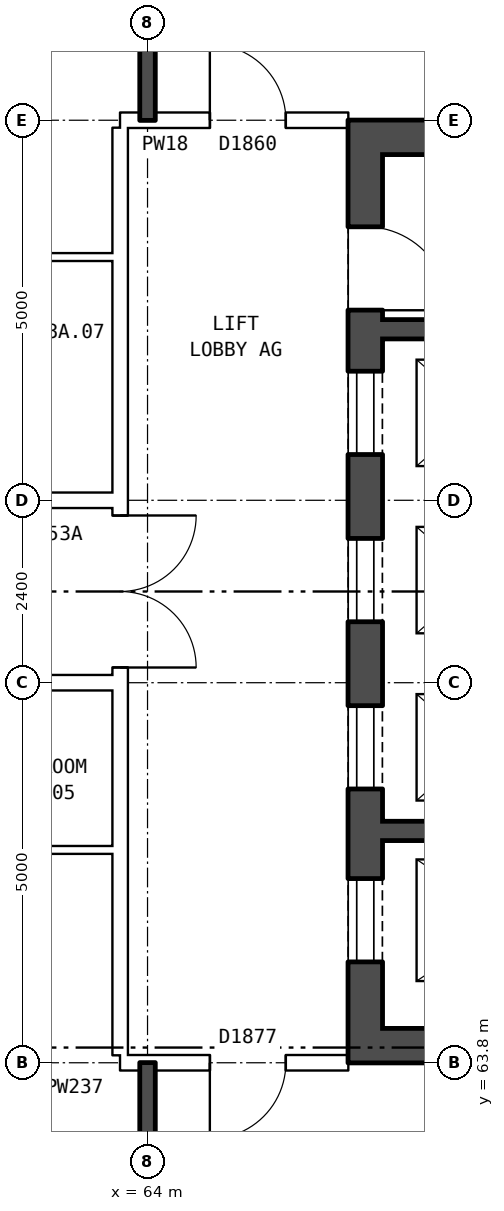
"""IFC4 building model, lengths in metres.
Left out: names, types, materials, properties, quantities, classifications, styles, units other than length and angle.
Written with IfcOpenShell. Run it as: python <this file> out.ifc"""

import sys

from ifc_helpers import new_model, si_unit, direction, frame, frame_2d, origin, place, context, subcontext, project, spatial, rectangle, extrude, element, fill, save


model = new_model("IFC4")
c1 = context("Model", 3, precision=1e-05, world=origin(), true_north=direction((0.0, 1.0)))
c2 = subcontext(c1, "Body", "Model", "MODEL_VIEW")
j1 = project(units=[si_unit("LENGTHUNIT", "METRE"), si_unit("PLANEANGLEUNIT", "RADIAN")], contexts=[c1])
p1 = place(None, origin())
s1 = spatial("IfcSite", under=j1, at=p1, CompositionType="ELEMENT")
p2 = place(p1, origin())
s2 = spatial("IfcBuilding", under=s1, at=p2, CompositionType="ELEMENT")
p3 = place(p2, frame((0.0, 0.0, 188.2)))
s3 = spatial("IfcBuildingStorey", under=s2, at=p3, CompositionType="ELEMENT", Elevation=188.2)
p4 = place(p3, frame((66.865, 63.8, 0.0), z_axis=(0.0, 0.0, 1.0), x_axis=(0.0, 1.0, 0.0)))
e1 = element("IfcWall", 1, at=p4, inside=s3, PredefinedType="SHEAR", context=c2, shape_type="SweptSolid", body=[
    extrude(rectangle(XDim=12.4, YDim=0.45, at=frame_2d((6.2, 0.0))), origin(), (0.0, 0.0, 1.0), 2.85),
])
p5 = place(p4, frame((1.325, 0.0, 0.0)))
e2 = element("IfcOpeningElement", 2, at=p5, cuts=e1, PredefinedType="OPENING", context=c2, shape_type="SweptSolid", body=[
    extrude(rectangle(XDim=1.1, YDim=2.1, at=frame_2d((0.55, 1.05))), frame((0.0, 0.235, 0.0), z_axis=(0.0, -1.0, 0.0), x_axis=(1.0, 0.0, 0.0)), (0.0, 0.0, 1.0), 0.47),
])
p6 = place(p4, frame((3.6, 0.0, 0.0)))
e3 = element("IfcOpeningElement", 3, at=p6, cuts=e1, PredefinedType="OPENING", context=c2, shape_type="SweptSolid", body=[
    extrude(rectangle(XDim=1.1, YDim=2.1, at=frame_2d((0.55, 1.05))), frame((0.0, 0.235, 0.0), z_axis=(0.0, -1.0, 0.0), x_axis=(1.0, 0.0, 0.0)), (0.0, 0.0, 1.0), 0.47),
])
p7 = place(p4, frame((5.8, 0.0, 0.0)))
e4 = element("IfcOpeningElement", 4, at=p7, cuts=e1, PredefinedType="OPENING", context=c2, shape_type="SweptSolid", body=[
    extrude(rectangle(XDim=1.1, YDim=2.1, at=frame_2d((0.55, 1.05))), frame((0.0, 0.235, 0.0), z_axis=(0.0, -1.0, 0.0), x_axis=(1.0, 0.0, 0.0)), (0.0, 0.0, 1.0), 0.47),
])
p8 = place(p4, frame((8.0, 0.0, 0.0)))
e5 = element("IfcOpeningElement", 5, at=p8, cuts=e1, PredefinedType="OPENING", context=c2, shape_type="SweptSolid", body=[
    extrude(rectangle(XDim=1.1, YDim=2.1, at=frame_2d((0.55, 1.05))), frame((0.0, 0.235, 0.0), z_axis=(0.0, -1.0, 0.0), x_axis=(1.0, 0.0, 0.0)), (0.0, 0.0, 1.0), 0.47),
])
p9 = place(p4, frame((9.9, 0.0, 0.0)))
e6 = element("IfcOpeningElement", 6, at=p9, cuts=e1, PredefinedType="OPENING", context=c2, shape_type="SweptSolid", body=[
    extrude(rectangle(XDim=1.1, YDim=2.1, at=frame_2d((0.55, 1.05))), frame((0.0, 0.235, 0.0), z_axis=(0.0, -1.0, 0.0), x_axis=(1.0, 0.0, 0.0)), (0.0, 0.0, 1.0), 0.47),
])
for number, where, z_axis, x_axis in (
    (7, (67.09, 64.025, 0.0), (0.0, 0.0, 1.0), (1.0, 0.0, 0.0)),
    (8, (67.09, 75.975, 0.0), (0.0, 0.0, 1.0), (1.0, 0.0, 0.0)),
):
    element("IfcWall", number, at=place(p3, frame(where, z_axis=z_axis, x_axis=x_axis)), inside=s3, PredefinedType="SHEAR", context=c2, shape_type="SweptSolid", body=[
        extrude(rectangle(XDim=8.1, YDim=0.45, at=frame_2d((4.05, 0.0))), origin(), (0.0, 0.0, 1.0), 2.85),
    ])
p10 = place(p3, frame((67.09, 66.85, 0.0), z_axis=(0.0, 0.0, 1.0), x_axis=(1.0, 0.0, 0.0)))
e9 = element("IfcWall", 9, at=p10, inside=s3, PredefinedType="SHEAR", context=c2, shape_type="SweptSolid", body=[
    extrude(rectangle(XDim=3.545, YDim=0.25, at=frame_2d((1.772, 0.0))), origin(), (0.0, 0.0, 1.0), 2.85),
])
p11 = place(p3, frame((67.09, 73.45, 0.0), z_axis=(0.0, 0.0, 1.0), x_axis=(1.0, 0.0, 0.0)))
e10 = element("IfcWall", 10, at=p11, inside=s3, PredefinedType="SHEAR", context=c2, shape_type="SweptSolid", body=[
    extrude(rectangle(XDim=2.475, YDim=0.25, at=frame_2d((1.237, 0.0))), origin(), (0.0, 0.0, 1.0), 2.85),
])
p12 = place(p3, frame((63.64, 63.9, 0.0), z_axis=(0.0, 0.0, 1.0), x_axis=(0.0, 1.0, 0.0)))
e11 = element("IfcWall", 11, at=p12, inside=s3, PredefinedType="PARTITIONING", context=c2, shape_type="SweptSolid", body=[
    extrude(rectangle(XDim=12.2, YDim=0.2, at=frame_2d((6.1, 0.0))), origin(), (0.0, 0.0, 1.0), 2.85),
])
p13 = place(p12, frame((5.1, 0.0, 0.0)))
e12 = element("IfcOpeningElement", 12, at=p13, cuts=e11, PredefinedType="OPENING", context=c2, shape_type="SweptSolid", body=[
    extrude(rectangle(XDim=2.0, YDim=2.1, at=frame_2d((1.0, 1.05))), frame((0.0, 0.11, 0.0), z_axis=(0.0, -1.0, 0.0), x_axis=(1.0, 0.0, 0.0)), (0.0, 0.0, 1.0), 0.22),
])
p14 = place(p3, frame((63.64, 63.8, 0.0), z_axis=(0.0, 0.0, 1.0), x_axis=(1.0, 0.0, 0.0)))
e13 = element("IfcWall", 13, at=p14, inside=s3, PredefinedType="PARTITIONING", context=c2, shape_type="SweptSolid", body=[
    extrude(rectangle(XDim=3.0, YDim=0.2, at=frame_2d((1.5, 0.0))), origin(), (0.0, 0.0, 1.0), 2.85),
])
p15 = place(p14, frame((1.18, 0.0, 0.0)))
e14 = element("IfcOpeningElement", 14, at=p15, cuts=e13, PredefinedType="OPENING", context=c2, shape_type="SweptSolid", body=[
    extrude(rectangle(XDim=1.0, YDim=2.1, at=frame_2d((0.5, 1.05))), frame((0.0, 0.11, 0.0), z_axis=(0.0, -1.0, 0.0), x_axis=(1.0, 0.0, 0.0)), (0.0, 0.0, 1.0), 0.22),
])
p16 = place(p3, frame((61.0, 66.6, 0.0), z_axis=(0.0, 0.0, 1.0), x_axis=(1.0, 0.0, 0.0)))
e15 = element("IfcWall", 15, at=p16, inside=s3, PredefinedType="PARTITIONING", context=c2, shape_type="SweptSolid", body=[
    extrude(rectangle(XDim=2.64, YDim=0.1, at=frame_2d((1.32, 0.0))), origin(), (0.0, 0.0, 1.0), 2.85),
])
p17 = place(p3, frame((44.36, 68.8, 0.0), z_axis=(0.0, 0.0, 1.0), x_axis=(1.0, 0.0, 0.0)))
e16 = element("IfcWall", 16, at=p17, inside=s3, PredefinedType="PARTITIONING", context=c2, shape_type="SweptSolid", body=[
    extrude(rectangle(XDim=19.28, YDim=0.2, at=frame_2d((9.64, 0.0))), origin(), (0.0, 0.0, 1.0), 2.85),
])
p18 = place(p17, frame((14.64, 0.0, 0.0)))
e17 = element("IfcOpeningElement", 17, at=p18, cuts=e16, PredefinedType="OPENING", context=c2, shape_type="SweptSolid", body=[
    extrude(rectangle(XDim=1.0, YDim=2.1, at=frame_2d((0.5, 1.05))), frame((0.0, 0.11, 0.0), z_axis=(0.0, -1.0, 0.0), x_axis=(1.0, 0.0, 0.0)), (0.0, 0.0, 1.0), 0.22),
])
p19 = place(p17, frame((5.64, 0.0, 0.0)))
e18 = element("IfcOpeningElement", 18, at=p19, cuts=e16, PredefinedType="OPENING", context=c2, shape_type="SweptSolid", body=[
    extrude(rectangle(XDim=1.0, YDim=2.1, at=frame_2d((0.5, 1.05))), frame((0.0, 0.11, 0.0), z_axis=(0.0, -1.0, 0.0), x_axis=(1.0, 0.0, 0.0)), (0.0, 0.0, 1.0), 0.22),
])
p20 = place(p3, frame((44.36, 71.2, 0.0), z_axis=(0.0, 0.0, 1.0), x_axis=(1.0, 0.0, 0.0)))
e19 = element("IfcWall", 19, at=p20, inside=s3, PredefinedType="PARTITIONING", context=c2, shape_type="SweptSolid", body=[
    extrude(rectangle(XDim=19.28, YDim=0.2, at=frame_2d((9.64, 0.0))), origin(), (0.0, 0.0, 1.0), 2.85),
])
p21 = place(p20, frame((14.64, 0.0, 0.0)))
e20 = element("IfcOpeningElement", 20, at=p21, cuts=e19, PredefinedType="OPENING", context=c2, shape_type="SweptSolid", body=[
    extrude(rectangle(XDim=1.0, YDim=2.1, at=frame_2d((0.5, 1.05))), frame((0.0, 0.11, 0.0), z_axis=(0.0, -1.0, 0.0), x_axis=(1.0, 0.0, 0.0)), (0.0, 0.0, 1.0), 0.22),
])
p22 = place(p20, frame((5.64, 0.0, 0.0)))
e21 = element("IfcOpeningElement", 21, at=p22, cuts=e19, PredefinedType="OPENING", context=c2, shape_type="SweptSolid", body=[
    extrude(rectangle(XDim=1.0, YDim=2.1, at=frame_2d((0.5, 1.05))), frame((0.0, 0.11, 0.0), z_axis=(0.0, -1.0, 0.0), x_axis=(1.0, 0.0, 0.0)), (0.0, 0.0, 1.0), 0.22),
])
p23 = place(p3, frame((61.0, 74.4, 0.0), z_axis=(0.0, 0.0, 1.0), x_axis=(1.0, 0.0, 0.0)))
e22 = element("IfcWall", 22, at=p23, inside=s3, PredefinedType="PARTITIONING", context=c2, shape_type="SweptSolid", body=[
    extrude(rectangle(XDim=2.64, YDim=0.1, at=frame_2d((1.32, 0.0))), origin(), (0.0, 0.0, 1.0), 2.85),
])
p24 = place(p3, frame((63.64, 76.2, 0.0), z_axis=(0.0, 0.0, 1.0), x_axis=(1.0, 0.0, 0.0)))
e23 = element("IfcWall", 23, at=p24, inside=s3, PredefinedType="PARTITIONING", context=c2, shape_type="SweptSolid", body=[
    extrude(rectangle(XDim=3.0, YDim=0.2, at=frame_2d((1.5, 0.0))), origin(), (0.0, 0.0, 1.0), 2.85),
])
p25 = place(p24, frame((1.18, 0.0, 0.0)))
e24 = element("IfcOpeningElement", 24, at=p25, cuts=e23, PredefinedType="OPENING", context=c2, shape_type="SweptSolid", body=[
    extrude(rectangle(XDim=1.0, YDim=2.1, at=frame_2d((0.5, 1.05))), frame((0.0, 0.11, 0.0), z_axis=(0.0, -1.0, 0.0), x_axis=(1.0, 0.0, 0.0)), (0.0, 0.0, 1.0), 0.22),
])
for number, where, z_axis, x_axis in (
    (25, (64.0, 54.36, 0.0), (0.0, 0.0, 1.0), (0.0, 1.0, 0.0)),
    (26, (64.0, 76.2, 0.0), (0.0, 0.0, 1.0), (0.0, 1.0, 0.0)),
):
    element("IfcWall", number, at=place(p3, frame(where, z_axis=z_axis, x_axis=x_axis)), inside=s3, PredefinedType="SOLIDWALL", context=c2, shape_type="SweptSolid", body=[
        extrude(rectangle(XDim=9.44, YDim=0.2, at=frame_2d((4.72, 0.0))), origin(), (0.0, 0.0, 1.0), 2.85),
    ])
p26 = place(p5, origin())
e27 = element("IfcDoor", 27, at=p26, inside=s3, OperationType="DOUBLE_DOOR_SLIDING", PredefinedType="DOOR", context=c2, shape_type="SweptSolid", body=[
    extrude(rectangle(XDim=1.1, YDim=2.1, at=frame_2d((0.55, 1.05))), frame((0.0, -0.16, 0.0), z_axis=(0.0, -1.0, 0.0), x_axis=(1.0, 0.0, 0.0)), (0.0, 0.0, 1.0), 0.05),
])
fill(e2, e27)
p27 = place(p6, origin())
e28 = element("IfcDoor", 28, at=p27, inside=s3, OperationType="DOUBLE_DOOR_SLIDING", PredefinedType="DOOR", context=c2, shape_type="SweptSolid", body=[
    extrude(rectangle(XDim=1.1, YDim=2.1, at=frame_2d((0.55, 1.05))), frame((0.0, -0.16, 0.0), z_axis=(0.0, -1.0, 0.0), x_axis=(1.0, 0.0, 0.0)), (0.0, 0.0, 1.0), 0.05),
])
fill(e3, e28)
p28 = place(p7, origin())
e29 = element("IfcDoor", 29, at=p28, inside=s3, OperationType="DOUBLE_DOOR_SLIDING", PredefinedType="DOOR", context=c2, shape_type="SweptSolid", body=[
    extrude(rectangle(XDim=1.1, YDim=2.1, at=frame_2d((0.55, 1.05))), frame((0.0, -0.16, 0.0), z_axis=(0.0, -1.0, 0.0), x_axis=(1.0, 0.0, 0.0)), (0.0, 0.0, 1.0), 0.05),
])
fill(e4, e29)
p29 = place(p8, origin())
e30 = element("IfcDoor", 30, at=p29, inside=s3, OperationType="DOUBLE_DOOR_SLIDING", PredefinedType="DOOR", context=c2, shape_type="SweptSolid", body=[
    extrude(rectangle(XDim=1.1, YDim=2.1, at=frame_2d((0.55, 1.05))), frame((0.0, -0.16, 0.0), z_axis=(0.0, -1.0, 0.0), x_axis=(1.0, 0.0, 0.0)), (0.0, 0.0, 1.0), 0.05),
])
fill(e5, e30)
p30 = place(p9, frame((1.1, 0.0, 0.0), z_axis=(0.0, 0.0, 1.0), x_axis=(-1.0, 0.0, 0.0)))
e31 = element("IfcDoor", 31, at=p30, inside=s3, OperationType="SINGLE_SWING_RIGHT", PredefinedType="DOOR", context=c2, shape_type="SweptSolid", body=[
    extrude(rectangle(XDim=1.1, YDim=2.1, at=frame_2d((0.55, 1.05))), frame((0.0, 0.21, 0.0), z_axis=(0.0, -1.0, 0.0), x_axis=(1.0, 0.0, 0.0)), (0.0, 0.0, 1.0), 0.05),
])
fill(e6, e31)
p31 = place(p13, frame((2.0, 0.0, 0.0), z_axis=(0.0, 0.0, 1.0), x_axis=(-1.0, 0.0, 0.0)))
e32 = element("IfcDoor", 32, at=p31, inside=s3, OperationType="DOUBLE_DOOR_SINGLE_SWING", PredefinedType="DOOR", context=c2, shape_type="SweptSolid", body=[
    extrude(rectangle(XDim=2.0, YDim=2.1, at=frame_2d((1.0, 1.05))), frame((0.0, 0.025, 0.0), z_axis=(0.0, -1.0, 0.0), x_axis=(1.0, 0.0, 0.0)), (0.0, 0.0, 1.0), 0.05),
])
fill(e12, e32)
p32 = place(p15, frame((1.0, 0.0, 0.0), z_axis=(0.0, 0.0, 1.0), x_axis=(-1.0, 0.0, 0.0)))
e33 = element("IfcDoor", 33, at=p32, inside=s3, OperationType="SINGLE_SWING_RIGHT", PredefinedType="DOOR", context=c2, shape_type="SweptSolid", body=[
    extrude(rectangle(XDim=1.0, YDim=2.1, at=frame_2d((0.5, 1.05))), frame((0.0, 0.025, 0.0), z_axis=(0.0, -1.0, 0.0), x_axis=(1.0, 0.0, 0.0)), (0.0, 0.0, 1.0), 0.05),
])
fill(e14, e33)
p33 = place(p25, origin())
e34 = element("IfcDoor", 34, at=p33, inside=s3, OperationType="SINGLE_SWING_LEFT", PredefinedType="DOOR", context=c2, shape_type="SweptSolid", body=[
    extrude(rectangle(XDim=1.0, YDim=2.1, at=frame_2d((0.5, 1.05))), frame((0.0, 0.025, 0.0), z_axis=(0.0, -1.0, 0.0), x_axis=(1.0, 0.0, 0.0)), (0.0, 0.0, 1.0), 0.05),
])
fill(e24, e34)
save(model, sys.argv[1])
